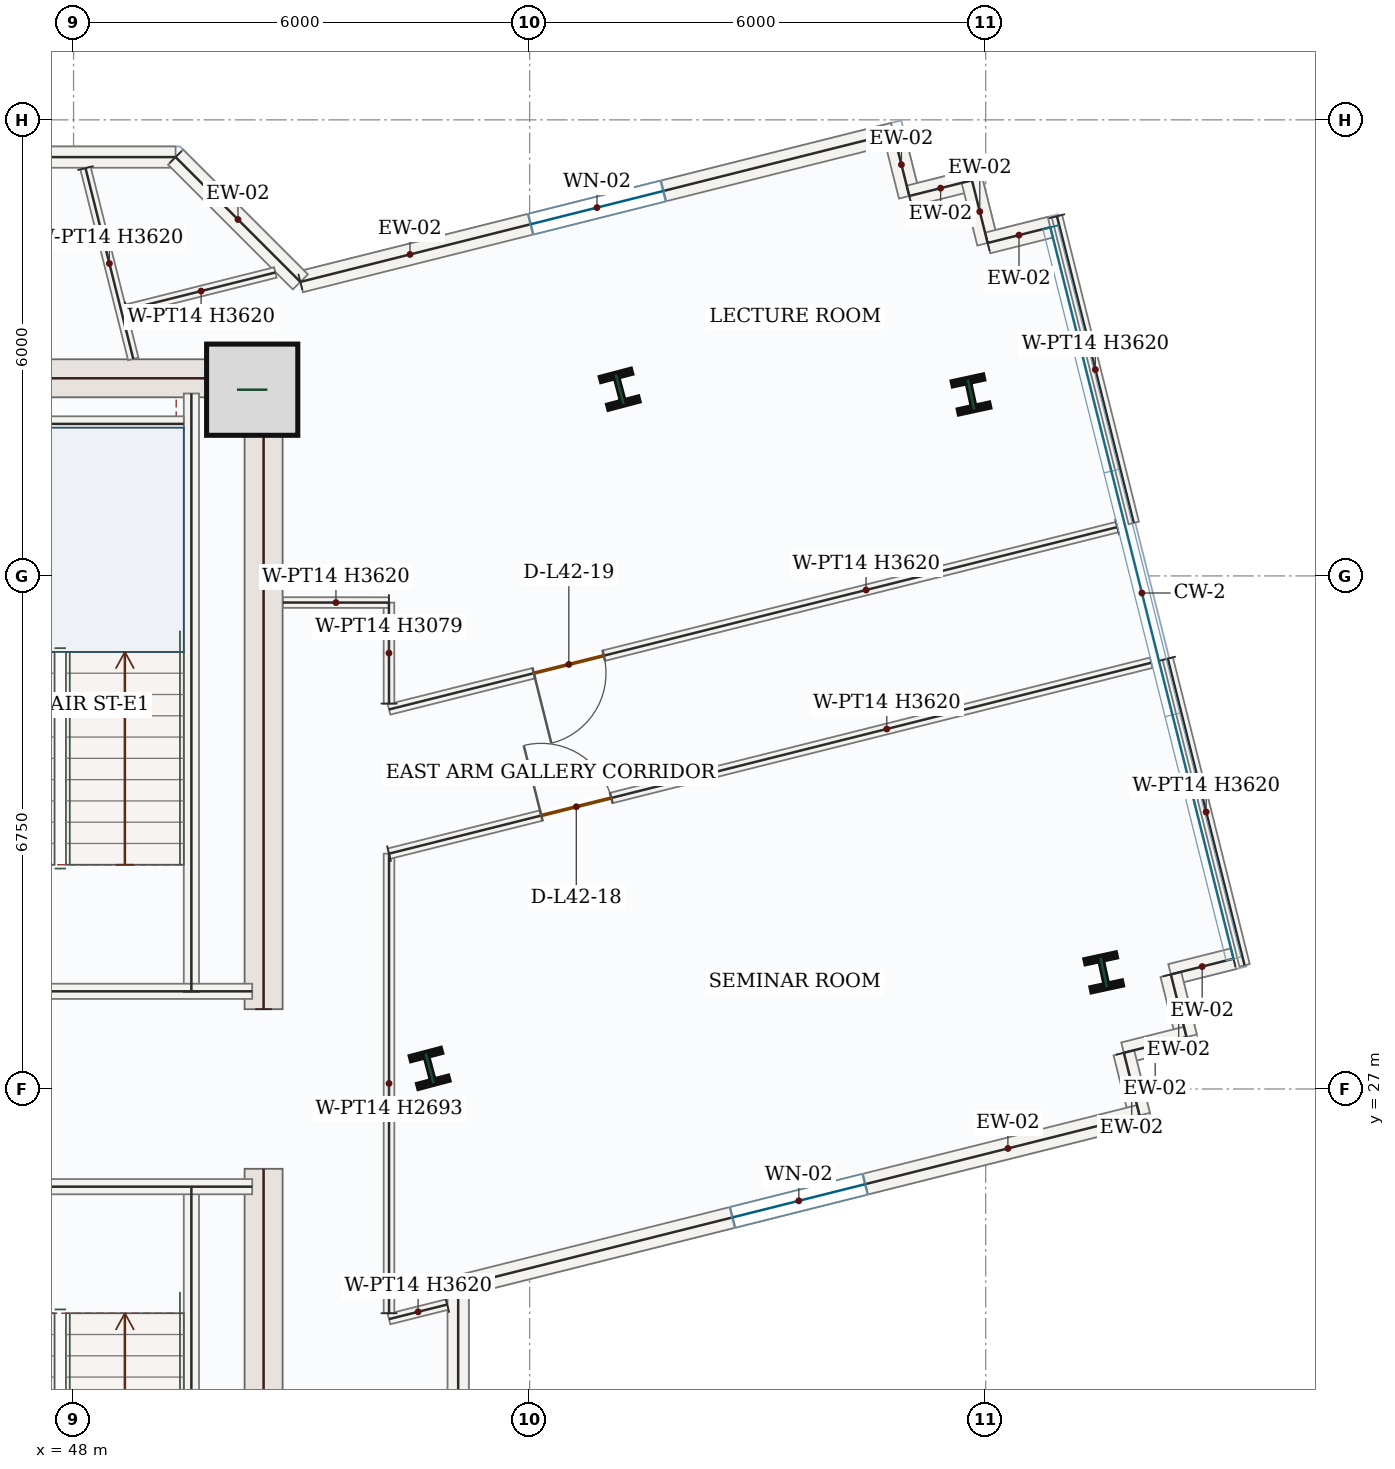
"""IFC4 building model, lengths in metres.
Left out: names, types, materials, properties, quantities, classifications, styles, units other than length and angle.
Written with IfcOpenShell. Run it as: python <this file> out.ifc"""

import sys

from ifc_helpers import new_model, si_unit, direction, frame, frame_2d, origin, origin_2d, place, context, subcontext, project, spatial, rectangle, i_section, extrude, source, transform, mapped, element, fill, save


model = new_model("IFC4")
c1 = context("Model", 3, precision=1e-05, world=origin(), true_north=direction((0.0, 1.0)))
c2 = subcontext(c1, "Body", "Model", "MODEL_VIEW")
j1 = project(units=[si_unit("LENGTHUNIT", "METRE"), si_unit("PLANEANGLEUNIT", "RADIAN")], contexts=[c1])
p1 = place(None, origin())
s1 = spatial("IfcSite", under=j1, at=p1, CompositionType="ELEMENT")
p2 = place(p1, origin())
s2 = spatial("IfcBuilding", under=s1, at=p2, CompositionType="ELEMENT")
p3 = place(p2, frame((0.0, 0.0, 182.4)))
s3 = spatial("IfcBuildingStorey", under=s2, at=p3, CompositionType="ELEMENT", Elevation=182.4)
m1 = source(origin(), c2, "Body", "SweptSolid", [
    extrude(rectangle(XDim=8.55, YDim=0.5, at=frame_2d((4.275, 0.0))), origin(), (0.0, 0.0, 1.0), 3.62),
])
for number, where, z_axis, x_axis in (
    (1, (50.5, 17.4, 0.0), (0.0, 0.0, 1.0), (0.0, 1.0, 0.0)),
    (2, (50.5, 28.05, 0.0), (0.0, 0.0, 1.0), (0.0, 1.0, 0.0)),
):
    element("IfcWall", number, at=place(p3, frame(where, z_axis=z_axis, x_axis=x_axis)), inside=s3, PredefinedType="SHEAR", context=c2, shape_type="MappedRepresentation", body=[
        mapped(m1, transform((0.0, 0.0, 0.0), x_axis=(1.0, 0.0, 0.0), y_axis=(0.0, 1.0, 0.0), z_axis=(0.0, 0.0, 1.0), scale=1.0)),
    ])
m2 = source(origin(), c2, "Body", "SweptSolid", [
    extrude(rectangle(XDim=7.0, YDim=0.5, at=frame_2d((3.5, 0.0))), origin(), (0.0, 0.0, 1.0), 3.62),
])
p4 = place(p3, frame((43.25, 36.35, 0.0), z_axis=(0.0, 0.0, 1.0), x_axis=(1.0, 0.0, 0.0)))
e3 = element("IfcWall", 3, at=p4, inside=s3, PredefinedType="SHEAR", context=c2, shape_type="MappedRepresentation", body=[
    mapped(m2, transform((0.0, 0.0, 0.0), x_axis=(1.0, 0.0, 0.0), y_axis=(0.0, 1.0, 0.0), z_axis=(0.0, 0.0, 1.0), scale=1.0)),
])
m3 = source(origin(), c2, "Body", "SweptSolid", [
    extrude(rectangle(XDim=1.2, YDim=1.2, at=origin_2d()), origin(), (0.0, 0.0, 1.0), 3.9),
])
p5 = place(p3, frame((50.35, 36.2, 0.0), z_axis=(0.0, 0.0, 1.0), x_axis=(1.0, 0.0, 0.0)))
e4 = element("IfcColumn", 4, at=p5, inside=s3, PredefinedType="COLUMN", context=c2, shape_type="MappedRepresentation", body=[
    mapped(m3, transform((0.0, 0.0, 0.0), x_axis=(1.0, 0.0, 0.0), y_axis=(0.0, 1.0, 0.0), z_axis=(0.0, 0.0, 1.0), scale=1.0)),
])
m4 = source(origin(), c2, "Body", "SweptSolid", [
    extrude(i_section(OverallWidth=0.412, OverallDepth=0.435, WebThickness=0.036, FlangeThickness=0.057, FilletRadius=0.018, at=origin_2d()), origin(), (0.0, 0.0, 1.0), 3.9),
])
for number, where, z_axis, x_axis in (
    (5, (52.684, 27.271, 0.0), (0.0, 0.0, 1.0), (0.967, 0.255, 0.0)),
    (6, (55.185, 36.206, 0.0), (0.0, 0.0, 1.0), (0.967, 0.255, 0.0)),
    (7, (61.553, 28.535, 0.0), (0.0, 0.0, 1.0), (0.977, 0.211, 0.0)),
    (8, (59.807, 36.137, 0.0), (0.0, 0.0, 1.0), (0.977, 0.211, 0.0)),
):
    element("IfcColumn", number, at=place(p3, frame(where, z_axis=z_axis, x_axis=x_axis)), inside=s3, PredefinedType="COLUMN", context=c2, shape_type="MappedRepresentation", body=[
        mapped(m4, transform((0.0, 0.0, 0.0), x_axis=(1.0, 0.0, 0.0), y_axis=(0.0, 1.0, 0.0), z_axis=(0.0, 0.0, 1.0), scale=1.0)),
    ])
p6 = place(p3, frame((50.984, 37.618, 0.0), z_axis=(0.0, 0.0, 1.0), x_axis=(0.970040669564, 0.242942584557, 0.0)))
e9 = element("IfcWall", 9, at=p6, inside=s3, PredefinedType="SOLIDWALL", context=c2, shape_type="SweptSolid", body=[
    extrude(rectangle(XDim=8.045, YDim=0.28, at=frame_2d((4.023, 0.0))), origin(), (0.0, 0.0, 1.0), 3.62),
])
p7 = place(p6, frame((3.123, 0.0, 0.85)))
e10 = element("IfcOpeningElement", 10, at=p7, cuts=e9, PredefinedType="OPENING", context=c2, shape_type="SweptSolid", body=[
    extrude(rectangle(XDim=1.8, YDim=1.75, at=frame_2d((0.9, 0.875))), frame((0.0, 0.15, 0.0), z_axis=(0.0, -1.0, 0.0), x_axis=(1.0, 0.0, 0.0)), (0.0, 0.0, 1.0), 0.3),
])
m5 = source(origin(), c2, "Body", "SweptSolid", [
    extrude(rectangle(XDim=0.85, YDim=0.28, at=frame_2d((0.425, 0.0))), origin(), (0.0, 0.0, 1.0), 3.62),
])
for number, where, z_axis, x_axis in (
    (11, (58.788, 39.573, 0.0), (0.0, 0.0, 1.0), (0.243, -0.97, 0.0)),
    (12, (58.995, 38.748, 0.0), (0.0, 0.0, 1.0), (0.97, 0.243, 0.0)),
):
    element("IfcWall", number, at=place(p3, frame(where, z_axis=z_axis, x_axis=x_axis)), inside=s3, PredefinedType="SOLIDWALL", context=c2, shape_type="MappedRepresentation", body=[
        mapped(m5, transform((0.0, 0.0, 0.0), x_axis=(1.0, 0.0, 0.0), y_axis=(0.0, 1.0, 0.0), z_axis=(0.0, 0.0, 1.0), scale=1.0)),
    ])
m6 = source(origin(), c2, "Body", "SweptSolid", [
    extrude(rectangle(XDim=0.85, YDim=0.28, at=frame_2d((0.425, 0.0))), origin(), (0.0, 0.0, 1.0), 3.62),
])
p8 = place(p3, frame((59.819, 38.955, 0.0), z_axis=(0.0, 0.0, 1.0), x_axis=(0.242941012307, -0.970041063326, 0.0)))
e13 = element("IfcWall", 13, at=p8, inside=s3, PredefinedType="SOLIDWALL", context=c2, shape_type="MappedRepresentation", body=[
    mapped(m6, transform((0.0, 0.0, 0.0), x_axis=(1.0, 0.0, 0.0), y_axis=(0.0, 1.0, 0.0), z_axis=(0.0, 0.0, 1.0), scale=1.0)),
])
for number, where, z_axis, x_axis in (
    (14, (60.026, 38.13, 0.0), (0.0, 0.0, 1.0), (0.97, 0.243, 0.0)),
    (15, (63.26, 28.714, 0.0), (0.0, 0.0, 1.0), (-0.97, -0.243, 0.0)),
    (16, (62.436, 28.507, 0.0), (0.0, 0.0, 1.0), (0.243, -0.97, 0.0)),
):
    element("IfcWall", number, at=place(p3, frame(where, z_axis=z_axis, x_axis=x_axis)), inside=s3, PredefinedType="SOLIDWALL", context=c2, shape_type="MappedRepresentation", body=[
        mapped(m5, transform((0.0, 0.0, 0.0), x_axis=(1.0, 0.0, 0.0), y_axis=(0.0, 1.0, 0.0), z_axis=(0.0, 0.0, 1.0), scale=1.0)),
    ])
p9 = place(p3, frame((62.642, 27.683, 0.0), z_axis=(0.0, 0.0, 1.0), x_axis=(-0.970041063326, -0.242941012307, 0.0)))
e17 = element("IfcWall", 17, at=p9, inside=s3, PredefinedType="SOLIDWALL", context=c2, shape_type="MappedRepresentation", body=[
    mapped(m6, transform((0.0, 0.0, 0.0), x_axis=(1.0, 0.0, 0.0), y_axis=(0.0, 1.0, 0.0), z_axis=(0.0, 0.0, 1.0), scale=1.0)),
])
p10 = place(p3, frame((61.818, 27.476, 0.0), z_axis=(0.0, 0.0, 1.0), x_axis=(0.243008704507, -0.970024107708, 0.0)))
e18 = element("IfcWall", 18, at=p10, inside=s3, PredefinedType="SOLIDWALL", context=c2, shape_type="MappedRepresentation", body=[
    mapped(m5, transform((0.0, 0.0, 0.0), x_axis=(1.0, 0.0, 0.0), y_axis=(0.0, 1.0, 0.0), z_axis=(0.0, 0.0, 1.0), scale=1.0)),
])
p11 = place(p3, frame((62.024, 26.652, 0.0), z_axis=(0.0, 0.0, 1.0), x_axis=(-0.970044513566, -0.242927235402, 0.0)))
e19 = element("IfcWall", 19, at=p11, inside=s3, PredefinedType="SOLIDWALL", context=c2, shape_type="SweptSolid", body=[
    extrude(rectangle(XDim=9.241, YDim=0.28, at=frame_2d((4.621, 0.0))), origin(), (0.0, 0.0, 1.0), 3.62),
])
p12 = place(p11, frame((3.721, 0.0, 0.85)))
e20 = element("IfcOpeningElement", 20, at=p12, cuts=e19, PredefinedType="OPENING", context=c2, shape_type="SweptSolid", body=[
    extrude(rectangle(XDim=1.8, YDim=1.75, at=frame_2d((0.9, 0.875))), frame((0.0, 0.15, 0.0), z_axis=(0.0, -1.0, 0.0), x_axis=(1.0, 0.0, 0.0)), (0.0, 0.0, 1.0), 0.3),
])
m7 = source(origin(), c2, "Body", "SweptSolid", [
    extrude(rectangle(XDim=5.949, YDim=0.28, at=frame_2d((2.975, 0.0))), origin(), (0.0, 0.0, 1.0), 3.62),
])
p13 = place(p3, frame((53.06, 24.407, 0.0), z_axis=(0.0, 0.0, 1.0), x_axis=(0.0, -1.0, 0.0)))
e21 = element("IfcWall", 21, at=p13, inside=s3, PredefinedType="SOLIDWALL", context=c2, shape_type="MappedRepresentation", body=[
    mapped(m7, transform((0.0, 0.0, 0.0), x_axis=(1.0, 0.0, 0.0), y_axis=(0.0, 1.0, 0.0), z_axis=(0.0, 0.0, 1.0), scale=1.0)),
])
m8 = source(origin(), c2, "Body", "SweptSolid", [
    extrude(rectangle(XDim=9.547, YDim=0.28, at=frame_2d((4.773, 0.0))), origin(), (0.0, 0.0, 1.0), 3.62),
])
p14 = place(p3, frame((39.795, 39.26, 0.0), z_axis=(0.0, 0.0, 1.0), x_axis=(1.0, 0.0, 0.0)))
e22 = element("IfcWall", 22, at=p14, inside=s3, PredefinedType="SOLIDWALL", context=c2, shape_type="MappedRepresentation", body=[
    mapped(m8, transform((0.0, 0.0, 0.0), x_axis=(1.0, 0.0, 0.0), y_axis=(0.0, 1.0, 0.0), z_axis=(0.0, 0.0, 1.0), scale=1.0)),
])
m9 = source(origin(), c2, "Body", "SweptSolid", [
    extrude(rectangle(XDim=2.322, YDim=0.28, at=frame_2d((1.161, 0.0))), origin(), (0.0, 0.0, 1.0), 3.62),
])
p15 = place(p3, frame((49.342, 39.26, 0.0), z_axis=(0.0, 0.0, 1.0), x_axis=(0.707106781187, -0.707106781187, 0.0)))
e23 = element("IfcWall", 23, at=p15, inside=s3, PredefinedType="SOLIDWALL", context=c2, shape_type="MappedRepresentation", body=[
    mapped(m9, transform((0.0, 0.0, 0.0), x_axis=(1.0, 0.0, 0.0), y_axis=(0.0, 1.0, 0.0), z_axis=(0.0, 0.0, 1.0), scale=1.0)),
])
m10 = source(origin(), c2, "Body", "SweptSolid", [
    extrude(rectangle(XDim=7.87, YDim=0.2, at=frame_2d((3.935, 0.0))), origin(), (0.0, 0.0, 1.0), 3.62),
])
for number, where, z_axis, x_axis in (
    (24, (49.55, 17.85, 0.0), (0.0, 0.0, 1.0), (0.0, 1.0, 0.0)),
    (25, (49.55, 28.28, 0.0), (0.0, 0.0, 1.0), (0.0, 1.0, 0.0)),
):
    element("IfcWall", number, at=place(p3, frame(where, z_axis=z_axis, x_axis=x_axis)), inside=s3, PredefinedType="SOLIDWALL", context=c2, shape_type="MappedRepresentation", body=[
        mapped(m10, transform((0.0, 0.0, 0.0), x_axis=(1.0, 0.0, 0.0), y_axis=(0.0, 1.0, 0.0), z_axis=(0.0, 0.0, 1.0), scale=1.0)),
    ])
m11 = source(origin(), c2, "Body", "SweptSolid", [
    extrude(rectangle(XDim=4.25, YDim=0.2, at=frame_2d((2.125, 0.0))), origin(), (0.0, 0.0, 1.0), 3.62),
])
for number, where, z_axis, x_axis in (
    (26, (46.1, 25.715, 0.0), (0.0, 0.0, 1.0), (1.0, 0.0, 0.0)),
    (27, (46.1, 28.285, 0.0), (0.0, 0.0, 1.0), (1.0, 0.0, 0.0)),
):
    element("IfcWall", number, at=place(p3, frame(where, z_axis=z_axis, x_axis=x_axis)), inside=s3, PredefinedType="SOLIDWALL", context=c2, shape_type="MappedRepresentation", body=[
        mapped(m11, transform((0.0, 0.0, 0.0), x_axis=(1.0, 0.0, 0.0), y_axis=(0.0, 1.0, 0.0), z_axis=(0.0, 0.0, 1.0), scale=1.0)),
    ])
m12 = source(origin(), c2, "Body", "SweptSolid", [
    extrude(rectangle(XDim=3.25, YDim=0.2, at=frame_2d((1.625, 0.0))), origin(), (0.0, 0.0, 1.0), 3.62),
])
p16 = place(p3, frame((46.2, 35.75, 0.0), z_axis=(0.0, 0.0, 1.0), x_axis=(1.0, 0.0, 0.0)))
e28 = element("IfcWall", 28, at=p16, inside=s3, PredefinedType="SOLIDWALL", context=c2, shape_type="MappedRepresentation", body=[
    mapped(m12, transform((0.0, 0.0, 0.0), x_axis=(1.0, 0.0, 0.0), y_axis=(0.0, 1.0, 0.0), z_axis=(0.0, 0.0, 1.0), scale=1.0)),
])
m13 = source(origin(), c2, "Body", "SweptSolid", [
    extrude(rectangle(XDim=2.588, YDim=0.14, at=frame_2d((1.294, 0.0))), origin(), (0.0, 0.0, 1.0), 3.62),
])
p17 = place(p3, frame((48.157, 39.115, 0.0), z_axis=(0.0, 0.0, 1.0), x_axis=(0.242957412811, -0.97003695577, 0.0)))
e29 = element("IfcWall", 29, at=p17, inside=s3, PredefinedType="PARTITIONING", context=c2, shape_type="MappedRepresentation", body=[
    mapped(m13, transform((0.0, 0.0, 0.0), x_axis=(1.0, 0.0, 0.0), y_axis=(0.0, 1.0, 0.0), z_axis=(0.0, 0.0, 1.0), scale=1.0)),
])
m14 = source(origin(), c2, "Body", "SweptSolid", [
    extrude(rectangle(XDim=2.014, YDim=0.14, at=frame_2d((1.007, 0.0))), origin(), (0.0, 0.0, 1.0), 3.62),
])
p18 = place(p3, frame((48.701, 37.253, 0.0), z_axis=(0.0, 0.0, 1.0), x_axis=(0.970056889313, 0.242877811867, 0.0)))
e30 = element("IfcWall", 30, at=p18, inside=s3, PredefinedType="PARTITIONING", context=c2, shape_type="MappedRepresentation", body=[
    mapped(m14, transform((0.0, 0.0, 0.0), x_axis=(1.0, 0.0, 0.0), y_axis=(0.0, 1.0, 0.0), z_axis=(0.0, 0.0, 1.0), scale=1.0)),
])
m15 = source(origin(), c2, "Body", "SweptSolid", [
    extrude(rectangle(XDim=4.16, YDim=0.14, at=frame_2d((2.08, 0.0))), origin(), (0.0, 0.0, 1.0), 3.62),
])
p19 = place(p3, frame((60.938, 38.482, 0.0), z_axis=(0.0, 0.0, 1.0), x_axis=(0.242963670411, -0.970035388458, 0.0)))
e31 = element("IfcWall", 31, at=p19, inside=s3, PredefinedType="PARTITIONING", context=c2, shape_type="MappedRepresentation", body=[
    mapped(m15, transform((0.0, 0.0, 0.0), x_axis=(1.0, 0.0, 0.0), y_axis=(0.0, 1.0, 0.0), z_axis=(0.0, 0.0, 1.0), scale=1.0)),
])
p20 = place(p3, frame((61.73, 34.392, 0.0), z_axis=(0.0, 0.0, 1.0), x_axis=(-0.970043536382, -0.242931137411, 0.0)))
e32 = element("IfcWall", 32, at=p20, inside=s3, PredefinedType="PARTITIONING", context=c2, shape_type="SweptSolid", body=[
    extrude(rectangle(XDim=9.876, YDim=0.14, at=frame_2d((4.938, 0.0))), origin(), (0.0, 0.0, 1.0), 3.62),
])
p21 = place(p20, frame((6.962, 0.0, 0.0)))
e33 = element("IfcOpeningElement", 33, at=p21, cuts=e32, PredefinedType="OPENING", context=c2, shape_type="SweptSolid", body=[
    extrude(rectangle(XDim=0.95, YDim=2.15, at=frame_2d((0.475, 1.075))), frame((0.0, 0.08, 0.0), z_axis=(0.0, -1.0, 0.0), x_axis=(1.0, 0.0, 0.0)), (0.0, 0.0, 1.0), 0.16),
])
m16 = source(origin(), c2, "Body", "SweptSolid", [
    extrude(rectangle(XDim=1.329, YDim=0.14, at=frame_2d((0.664, 0.0))), origin(), (0.0, 0.0, 1.0), 3.079),
])
p22 = place(p3, frame((52.15, 32.07, 0.0), z_axis=(0.0, 0.0, 1.0), x_axis=(-0.00073502369, 0.99999972987, 0.0)))
e34 = element("IfcWall", 34, at=p22, inside=s3, PredefinedType="PARTITIONING", context=c2, shape_type="MappedRepresentation", body=[
    mapped(m16, transform((0.0, 0.0, 0.0), x_axis=(1.0, 0.0, 0.0), y_axis=(0.0, 1.0, 0.0), z_axis=(0.0, 0.0, 1.0), scale=1.0)),
])
m17 = source(origin(), c2, "Body", "SweptSolid", [
    extrude(rectangle(XDim=1.394, YDim=0.14, at=frame_2d((0.697, 0.0))), origin(), (0.0, 0.0, 1.0), 3.62),
])
p23 = place(p3, frame((52.149, 33.399, 0.0), z_axis=(0.0, 0.0, 1.0), x_axis=(-0.999999754632, 0.000700525222, 0.0)))
e35 = element("IfcWall", 35, at=p23, inside=s3, PredefinedType="PARTITIONING", context=c2, shape_type="MappedRepresentation", body=[
    mapped(m17, transform((0.0, 0.0, 0.0), x_axis=(1.0, 0.0, 0.0), y_axis=(0.0, 1.0, 0.0), z_axis=(0.0, 0.0, 1.0), scale=1.0)),
])
p24 = place(p3, frame((62.395, 32.662, 0.0), z_axis=(0.0, 0.0, 1.0), x_axis=(0.242963670411, -0.970035388458, 0.0)))
e36 = element("IfcWall", 36, at=p24, inside=s3, PredefinedType="PARTITIONING", context=c2, shape_type="MappedRepresentation", body=[
    mapped(m15, transform((0.0, 0.0, 0.0), x_axis=(1.0, 0.0, 0.0), y_axis=(0.0, 1.0, 0.0), z_axis=(0.0, 0.0, 1.0), scale=1.0)),
])
m18 = source(origin(), c2, "Body", "SweptSolid", [
    extrude(rectangle(XDim=0.789, YDim=0.14, at=frame_2d((0.395, 0.0))), origin(), (0.0, 0.0, 1.0), 3.62),
])
p25 = place(p3, frame((52.915, 24.164, 0.0), z_axis=(0.0, 0.0, 1.0), x_axis=(-0.970033159667, -0.242972568711, 0.0)))
e37 = element("IfcWall", 37, at=p25, inside=s3, PredefinedType="PARTITIONING", context=c2, shape_type="MappedRepresentation", body=[
    mapped(m18, transform((0.0, 0.0, 0.0), x_axis=(1.0, 0.0, 0.0), y_axis=(0.0, 1.0, 0.0), z_axis=(0.0, 0.0, 1.0), scale=1.0)),
])
m19 = source(origin(), c2, "Body", "SweptSolid", [
    extrude(rectangle(XDim=6.046, YDim=0.14, at=frame_2d((3.023, 0.0))), origin(), (0.0, 0.0, 1.0), 2.693),
])
p26 = place(p3, frame((52.15, 24.05, 0.0), z_axis=(0.0, 0.0, 1.0), x_axis=(0.0, 1.0, 0.0)))
e38 = element("IfcWall", 38, at=p26, inside=s3, PredefinedType="PARTITIONING", context=c2, shape_type="MappedRepresentation", body=[
    mapped(m19, transform((0.0, 0.0, 0.0), x_axis=(1.0, 0.0, 0.0), y_axis=(0.0, 1.0, 0.0), z_axis=(0.0, 0.0, 1.0), scale=1.0)),
])
p27 = place(p3, frame((52.15, 30.096, 0.0), z_axis=(0.0, 0.0, 1.0), x_axis=(0.970040994122, 0.242941288635, 0.0)))
e39 = element("IfcWall", 39, at=p27, inside=s3, PredefinedType="PARTITIONING", context=c2, shape_type="SweptSolid", body=[
    extrude(rectangle(XDim=10.337, YDim=0.14, at=frame_2d((5.168, 0.0))), origin(), (0.0, 0.0, 1.0), 3.62),
])
p28 = place(p27, frame((2.065, 0.0, 0.0)))
e40 = element("IfcOpeningElement", 40, at=p28, cuts=e39, PredefinedType="OPENING", context=c2, shape_type="SweptSolid", body=[
    extrude(rectangle(XDim=0.95, YDim=2.15, at=frame_2d((0.475, 1.075))), frame((0.0, 0.08, 0.0), z_axis=(0.0, -1.0, 0.0), x_axis=(1.0, 0.0, 0.0)), (0.0, 0.0, 1.0), 0.16),
])
m20 = source(origin(), c2, "Body", "SweptSolid", [
    extrude(rectangle(XDim=1.8, YDim=1.75, at=frame_2d((0.9, 0.875))), frame((0.0, 0.03, 0.0), z_axis=(0.0, -1.0, 0.0), x_axis=(1.0, 0.0, 0.0)), (0.0, 0.0, 1.0), 0.06),
])
p29 = place(p7, origin())
e41 = element("IfcWindow", 41, at=p29, inside=s3, PartitioningType="DOUBLE_PANEL_VERTICAL", PredefinedType="WINDOW", context=c2, shape_type="MappedRepresentation", body=[
    mapped(m20, transform((0.0, 0.0, 0.0), x_axis=(1.0, 0.0, 0.0), y_axis=(0.0, 1.0, 0.0), z_axis=(0.0, 0.0, 1.0), scale=1.0)),
])
fill(e10, e41)
p30 = place(p12, origin())
e42 = element("IfcWindow", 42, at=p30, inside=s3, PartitioningType="DOUBLE_PANEL_VERTICAL", PredefinedType="WINDOW", context=c2, shape_type="MappedRepresentation", body=[
    mapped(m20, transform((0.0, 0.0, 0.0), x_axis=(1.0, 0.0, 0.0), y_axis=(0.0, 1.0, 0.0), z_axis=(0.0, 0.0, 1.0), scale=1.0)),
])
fill(e20, e42)
m21 = source(origin(), c2, "Body", "SweptSolid", [
    extrude(rectangle(XDim=0.95, YDim=2.15, at=frame_2d((0.475, 1.075))), frame((0.0, 0.025, 0.0), z_axis=(0.0, -1.0, 0.0), x_axis=(1.0, 0.0, 0.0)), (0.0, 0.0, 1.0), 0.05),
])
p31 = place(p28, origin())
e43 = element("IfcDoor", 43, at=p31, inside=s3, OperationType="SINGLE_SWING_LEFT", PredefinedType="DOOR", context=c2, shape_type="MappedRepresentation", body=[
    mapped(m21, transform((0.0, 0.0, 0.0), x_axis=(1.0, 0.0, 0.0), y_axis=(0.0, 1.0, 0.0), z_axis=(0.0, 0.0, 1.0), scale=1.0)),
])
fill(e40, e43)
p32 = place(p21, origin())
e44 = element("IfcDoor", 44, at=p32, inside=s3, OperationType="SINGLE_SWING_RIGHT", PredefinedType="DOOR", context=c2, shape_type="MappedRepresentation", body=[
    mapped(m21, transform((0.0, 0.0, 0.0), x_axis=(1.0, 0.0, 0.0), y_axis=(0.0, 1.0, 0.0), z_axis=(0.0, 0.0, 1.0), scale=1.0)),
])
fill(e33, e44)
save(model, sys.argv[1])
